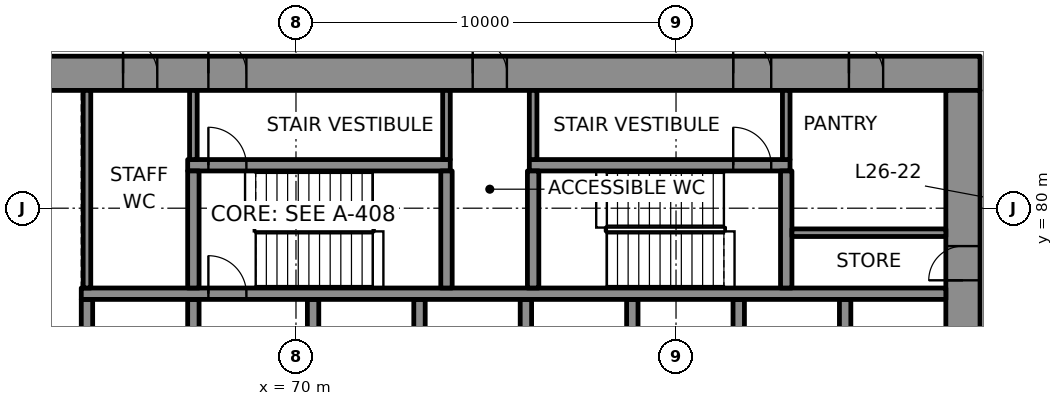
"""IFC4 building model, lengths in metres.
Left out: names, types, materials, properties, quantities, classifications, styles, units other than length and angle.
Written with IfcOpenShell. Run it as: python <this file> out.ifc"""

import sys

from ifc_helpers import new_model, si_unit, direction, frame, frame_2d, origin, place, context, subcontext, project, spatial, rectangle, extrude, element, fill, save


model = new_model("IFC4")
c1 = context("Model", 3, precision=1e-05, world=origin(), true_north=direction((0.0, 1.0)))
c2 = subcontext(c1, "Body", "Model", "MODEL_VIEW")
j1 = project(units=[si_unit("LENGTHUNIT", "METRE"), si_unit("PLANEANGLEUNIT", "RADIAN")], contexts=[c1])
p1 = place(None, origin())
s1 = spatial("IfcSite", under=j1, at=p1, CompositionType="ELEMENT")
p2 = place(p1, origin())
s2 = spatial("IfcBuilding", under=s1, at=p2, CompositionType="ELEMENT")
p3 = place(p2, frame((0.0, 0.0, 115.6)))
s3 = spatial("IfcBuildingStorey", under=s2, at=p3, CompositionType="ELEMENT", Elevation=115.6)
p4 = place(p3, frame((62.9, 83.55, 0.0), z_axis=(0.0, 0.0, 1.0), x_axis=(1.0, 0.0, 0.0)))
e1 = element("IfcWall", 1, at=p4, inside=s3, PredefinedType="SHEAR", context=c2, shape_type="SweptSolid", body=[
    extrude(rectangle(XDim=25.1, YDim=0.9, at=frame_2d((12.55, 0.0))), origin(), (0.0, 0.0, 1.0), 4.0),
])
p5 = place(p4, frame((4.795, 0.0, 0.0)))
e2 = element("IfcOpeningElement", 2, at=p5, cuts=e1, PredefinedType="OPENING", context=c2, shape_type="SweptSolid", body=[
    extrude(rectangle(XDim=1.0, YDim=2.1, at=frame_2d((0.5, 1.05))), frame((0.0, 0.46, 0.0), z_axis=(0.0, -1.0, 0.0), x_axis=(1.0, 0.0, 0.0)), (0.0, 0.0, 1.0), 0.92),
])
p6 = place(p4, frame((18.605, 0.0, 0.0)))
e3 = element("IfcOpeningElement", 3, at=p6, cuts=e1, PredefinedType="OPENING", context=c2, shape_type="SweptSolid", body=[
    extrude(rectangle(XDim=1.0, YDim=2.1, at=frame_2d((0.5, 1.05))), frame((0.0, 0.46, 0.0), z_axis=(0.0, -1.0, 0.0), x_axis=(1.0, 0.0, 0.0)), (0.0, 0.0, 1.0), 0.92),
])
p7 = place(p4, frame((2.55, 0.0, 0.0)))
e4 = element("IfcOpeningElement", 4, at=p7, cuts=e1, PredefinedType="OPENING", context=c2, shape_type="SweptSolid", body=[
    extrude(rectangle(XDim=0.9, YDim=2.1, at=frame_2d((0.45, 1.05))), frame((0.0, 0.46, 0.0), z_axis=(0.0, -1.0, 0.0), x_axis=(1.0, 0.0, 0.0)), (0.0, 0.0, 1.0), 0.92),
])
p8 = place(p4, frame((11.75, 0.0, 0.0)))
e5 = element("IfcOpeningElement", 5, at=p8, cuts=e1, PredefinedType="OPENING", context=c2, shape_type="SweptSolid", body=[
    extrude(rectangle(XDim=0.9, YDim=2.1, at=frame_2d((0.45, 1.05))), frame((0.0, 0.46, 0.0), z_axis=(0.0, -1.0, 0.0), x_axis=(1.0, 0.0, 0.0)), (0.0, 0.0, 1.0), 0.92),
])
p9 = place(p4, frame((21.65, 0.0, 0.0)))
e6 = element("IfcOpeningElement", 6, at=p9, cuts=e1, PredefinedType="OPENING", context=c2, shape_type="SweptSolid", body=[
    extrude(rectangle(XDim=0.9, YDim=2.1, at=frame_2d((0.45, 1.05))), frame((0.0, 0.46, 0.0), z_axis=(0.0, -1.0, 0.0), x_axis=(1.0, 0.0, 0.0)), (0.0, 0.0, 1.0), 0.92),
])
p10 = place(p3, frame((87.55, 66.9, 0.0), z_axis=(0.0, 0.0, 1.0), x_axis=(0.0, 1.0, 0.0)))
e7 = element("IfcWall", 7, at=p10, inside=s3, PredefinedType="SHEAR", context=c2, shape_type="SweptSolid", body=[
    extrude(rectangle(XDim=16.2, YDim=0.9, at=frame_2d((8.1, 0.0))), origin(), (0.0, 0.0, 1.0), 4.0),
])
p11 = place(p10, frame((5.5, 0.0, 0.0)))
e8 = element("IfcOpeningElement", 8, at=p11, cuts=e7, PredefinedType="OPENING", context=c2, shape_type="SweptSolid", body=[
    extrude(rectangle(XDim=1.8, YDim=2.1, at=frame_2d((0.9, 1.05))), frame((0.0, 0.46, 0.0), z_axis=(0.0, -1.0, 0.0), x_axis=(1.0, 0.0, 0.0)), (0.0, 0.0, 1.0), 0.92),
])
p12 = place(p10, frame((11.202, 0.0, 0.0)))
e9 = element("IfcOpeningElement", 9, at=p12, cuts=e7, PredefinedType="OPENING", context=c2, shape_type="SweptSolid", body=[
    extrude(rectangle(XDim=0.9, YDim=2.1, at=frame_2d((0.45, 1.05))), frame((0.0, 0.46, 0.0), z_axis=(0.0, -1.0, 0.0), x_axis=(1.0, 0.0, 0.0)), (0.0, 0.0, 1.0), 0.92),
])
for number, where, z_axis, x_axis in (
    (10, (64.5, 75.0, 0.0), (0.0, 0.0, 1.0), (0.0, 1.0, 0.0)),
    (11, (67.3, 75.0, 0.0), (0.0, 0.0, 1.0), (0.0, 1.0, 0.0)),
):
    element("IfcWall", number, at=place(p3, frame(where, z_axis=z_axis, x_axis=x_axis)), inside=s3, PredefinedType="SHEAR", context=c2, shape_type="SweptSolid", body=[
        extrude(rectangle(XDim=2.6, YDim=0.3, at=frame_2d((1.3, 0.0))), origin(), (0.0, 0.0, 1.0), 4.0),
    ])
p13 = place(p3, frame((70.45, 75.0, 0.0), z_axis=(0.0, 0.0, 1.0), x_axis=(0.0, 1.0, 0.0)))
e12 = element("IfcWall", 12, at=p13, inside=s3, PredefinedType="SHEAR", context=c2, shape_type="SweptSolid", body=[
    extrude(rectangle(XDim=2.6, YDim=0.3, at=frame_2d((1.3, 0.0))), origin(), (0.0, 0.0, 1.0), 4.0),
])
p14 = place(p13, frame((0.15, 0.0, 0.0)))
e13 = element("IfcOpeningElement", 13, at=p14, cuts=e12, PredefinedType="OPENING", context=c2, shape_type="SweptSolid", body=[
    extrude(rectangle(XDim=1.1, YDim=2.1, at=frame_2d((0.55, 1.05))), frame((0.0, 0.16, 0.0), z_axis=(0.0, -1.0, 0.0), x_axis=(1.0, 0.0, 0.0)), (0.0, 0.0, 1.0), 0.32),
])
for number, where, z_axis, x_axis in (
    (14, (73.25, 75.0, 0.0), (0.0, 0.0, 1.0), (0.0, 1.0, 0.0)),
    (15, (76.05, 75.0, 0.0), (0.0, 0.0, 1.0), (0.0, 1.0, 0.0)),
    (16, (78.85, 75.0, 0.0), (0.0, 0.0, 1.0), (0.0, 1.0, 0.0)),
    (17, (81.65, 75.0, 0.0), (0.0, 0.0, 1.0), (0.0, 1.0, 0.0)),
    (18, (84.45, 75.0, 0.0), (0.0, 0.0, 1.0), (0.0, 1.0, 0.0)),
):
    element("IfcWall", number, at=place(p3, frame(where, z_axis=z_axis, x_axis=x_axis)), inside=s3, PredefinedType="SHEAR", context=c2, shape_type="SweptSolid", body=[
        extrude(rectangle(XDim=2.6, YDim=0.3, at=frame_2d((1.3, 0.0))), origin(), (0.0, 0.0, 1.0), 4.0),
    ])
p15 = place(p3, frame((64.35, 77.75, 0.0), z_axis=(0.0, 0.0, 1.0), x_axis=(1.0, 0.0, 0.0)))
e19 = element("IfcWall", 19, at=p15, inside=s3, PredefinedType="SHEAR", context=c2, shape_type="SweptSolid", body=[
    extrude(rectangle(XDim=22.75, YDim=0.3, at=frame_2d((11.375, 0.0))), origin(), (0.0, 0.0, 1.0), 4.0),
])
p16 = place(p15, frame((3.345, 0.0, 0.0)))
e20 = element("IfcOpeningElement", 20, at=p16, cuts=e19, PredefinedType="OPENING", context=c2, shape_type="SweptSolid", body=[
    extrude(rectangle(XDim=1.0, YDim=2.1, at=frame_2d((0.5, 1.05))), frame((0.0, 0.16, 0.0), z_axis=(0.0, -1.0, 0.0), x_axis=(1.0, 0.0, 0.0)), (0.0, 0.0, 1.0), 0.32),
])
p17 = place(p3, frame((67.15, 81.13, 0.0), z_axis=(0.0, 0.0, 1.0), x_axis=(1.0, 0.0, 0.0)))
e21 = element("IfcWall", 21, at=p17, inside=s3, PredefinedType="SHEAR", context=c2, shape_type="SweptSolid", body=[
    extrude(rectangle(XDim=6.91, YDim=0.3, at=frame_2d((3.455, 0.0))), origin(), (0.0, 0.0, 1.0), 4.0),
])
p18 = place(p17, frame((0.545, 0.0, 0.0)))
e22 = element("IfcOpeningElement", 22, at=p18, cuts=e21, PredefinedType="OPENING", context=c2, shape_type="SweptSolid", body=[
    extrude(rectangle(XDim=1.0, YDim=2.1, at=frame_2d((0.5, 1.05))), frame((0.0, 0.16, 0.0), z_axis=(0.0, -1.0, 0.0), x_axis=(1.0, 0.0, 0.0)), (0.0, 0.0, 1.0), 0.32),
])
p19 = place(p3, frame((76.14, 81.13, 0.0), z_axis=(0.0, 0.0, 1.0), x_axis=(1.0, 0.0, 0.0)))
e23 = element("IfcWall", 23, at=p19, inside=s3, PredefinedType="SHEAR", context=c2, shape_type="SweptSolid", body=[
    extrude(rectangle(XDim=6.86, YDim=0.3, at=frame_2d((3.43, 0.0))), origin(), (0.0, 0.0, 1.0), 4.0),
])
p20 = place(p19, frame((5.365, 0.0, 0.0)))
e24 = element("IfcOpeningElement", 24, at=p20, cuts=e23, PredefinedType="OPENING", context=c2, shape_type="SweptSolid", body=[
    extrude(rectangle(XDim=1.0, YDim=2.1, at=frame_2d((0.5, 1.05))), frame((0.0, 0.16, 0.0), z_axis=(0.0, -1.0, 0.0), x_axis=(1.0, 0.0, 0.0)), (0.0, 0.0, 1.0), 0.32),
])
for number, where, z_axis, x_axis in (
    (25, (67.3, 77.9, 0.0), (0.0, 0.0, 1.0), (0.0, 1.0, 0.0)),
    (26, (73.96, 77.9, 0.0), (0.0, 0.0, 1.0), (0.0, 1.0, 0.0)),
    (27, (76.24, 77.9, 0.0), (0.0, 0.0, 1.0), (0.0, 1.0, 0.0)),
    (28, (82.9, 77.9, 0.0), (0.0, 0.0, 1.0), (0.0, 1.0, 0.0)),
):
    element("IfcWall", number, at=place(p3, frame(where, z_axis=z_axis, x_axis=x_axis)), inside=s3, PredefinedType="SHEAR", context=c2, shape_type="SweptSolid", body=[
        extrude(rectangle(XDim=3.08, YDim=0.3, at=frame_2d((1.54, 0.0))), origin(), (0.0, 0.0, 1.0), 4.0),
    ])
p21 = place(p3, frame((69.117, 112.258, 0.0), z_axis=(0.0, 0.0, 1.0), x_axis=(-0.5000008632, -0.866024905415, 0.0)))
e29 = element("IfcWall", 29, at=p21, inside=s3, PredefinedType="SOLIDWALL", context=c2, shape_type="SweptSolid", body=[
    extrude(rectangle(XDim=40.13, YDim=0.8, at=frame_2d((20.065, 0.0))), origin(), (0.0, 0.0, 1.0), 0.9),
])
p22 = place(p3, frame((83.05, 79.355, 0.0), z_axis=(0.0, 0.0, 1.0), x_axis=(1.0, 0.0, 0.0)))
e30 = element("IfcWall", 30, at=p22, inside=s3, PredefinedType="PARTITIONING", context=c2, shape_type="SweptSolid", body=[
    extrude(rectangle(XDim=4.05, YDim=0.2, at=frame_2d((2.025, 0.0))), origin(), (0.0, 0.0, 1.0), 4.0),
])
p23 = place(p3, frame((64.5, 77.9, 0.0), z_axis=(0.0, 0.0, 1.0), x_axis=(0.0, 1.0, 0.0)))
e31 = element("IfcWall", 31, at=p23, inside=s3, PredefinedType="PARTITIONING", context=c2, shape_type="SweptSolid", body=[
    extrude(rectangle(XDim=5.2, YDim=0.2, at=frame_2d((2.6, 0.0))), origin(), (0.0, 0.0, 1.0), 4.0),
])
for number, where, z_axis, x_axis in (
    (32, (67.3, 81.28, 0.0), (0.0, 0.0, 1.0), (0.0, 1.0, 0.0)),
    (33, (73.96, 81.28, 0.0), (0.0, 0.0, 1.0), (0.0, 1.0, 0.0)),
    (34, (76.24, 81.28, 0.0), (0.0, 0.0, 1.0), (0.0, 1.0, 0.0)),
    (35, (82.9, 81.28, 0.0), (0.0, 0.0, 1.0), (0.0, 1.0, 0.0)),
):
    element("IfcWall", number, at=place(p3, frame(where, z_axis=z_axis, x_axis=x_axis)), inside=s3, PredefinedType="PARTITIONING", context=c2, shape_type="SweptSolid", body=[
        extrude(rectangle(XDim=1.82, YDim=0.2, at=frame_2d((0.91, 0.0))), origin(), (0.0, 0.0, 1.0), 4.0),
    ])
p24 = place(p16, origin())
e36 = element("IfcDoor", 36, at=p24, inside=s3, OperationType="SINGLE_SWING_LEFT", PredefinedType="DOOR", context=c2, shape_type="SweptSolid", body=[
    extrude(rectangle(XDim=1.0, YDim=2.1, at=frame_2d((0.5, 1.05))), frame((0.0, 0.025, 0.0), z_axis=(0.0, -1.0, 0.0), x_axis=(1.0, 0.0, 0.0)), (0.0, 0.0, 1.0), 0.05),
])
fill(e20, e36)
p25 = place(p18, origin())
e37 = element("IfcDoor", 37, at=p25, inside=s3, OperationType="SINGLE_SWING_RIGHT", PredefinedType="DOOR", context=c2, shape_type="SweptSolid", body=[
    extrude(rectangle(XDim=1.0, YDim=2.1, at=frame_2d((0.5, 1.05))), frame((0.0, 0.025, 0.0), z_axis=(0.0, -1.0, 0.0), x_axis=(1.0, 0.0, 0.0)), (0.0, 0.0, 1.0), 0.05),
])
fill(e22, e37)
p26 = place(p5, origin())
e38 = element("IfcDoor", 38, at=p26, inside=s3, OperationType="SINGLE_SWING_LEFT", PredefinedType="DOOR", context=c2, shape_type="SweptSolid", body=[
    extrude(rectangle(XDim=1.0, YDim=2.1, at=frame_2d((0.5, 1.05))), frame((0.0, 0.17, 0.0), z_axis=(0.0, -1.0, 0.0), x_axis=(1.0, 0.0, 0.0)), (0.0, 0.0, 1.0), 0.34),
])
fill(e2, e38)
p27 = place(p20, origin())
e39 = element("IfcDoor", 39, at=p27, inside=s3, OperationType="SINGLE_SWING_RIGHT", PredefinedType="DOOR", context=c2, shape_type="SweptSolid", body=[
    extrude(rectangle(XDim=1.0, YDim=2.1, at=frame_2d((0.5, 1.05))), frame((0.0, 0.025, 0.0), z_axis=(0.0, -1.0, 0.0), x_axis=(1.0, 0.0, 0.0)), (0.0, 0.0, 1.0), 0.05),
])
fill(e24, e39)
p28 = place(p6, origin())
e40 = element("IfcDoor", 40, at=p28, inside=s3, OperationType="SINGLE_SWING_LEFT", PredefinedType="DOOR", context=c2, shape_type="SweptSolid", body=[
    extrude(rectangle(XDim=1.0, YDim=2.1, at=frame_2d((0.5, 1.05))), frame((0.0, 0.17, 0.0), z_axis=(0.0, -1.0, 0.0), x_axis=(1.0, 0.0, 0.0)), (0.0, 0.0, 1.0), 0.34),
])
fill(e3, e40)
p29 = place(p7, origin())
e41 = element("IfcDoor", 41, at=p29, inside=s3, OperationType="SINGLE_SWING_RIGHT", PredefinedType="DOOR", context=c2, shape_type="SweptSolid", body=[
    extrude(rectangle(XDim=0.9, YDim=2.1, at=frame_2d((0.45, 1.05))), frame((0.0, 0.17, 0.0), z_axis=(0.0, -1.0, 0.0), x_axis=(1.0, 0.0, 0.0)), (0.0, 0.0, 1.0), 0.34),
])
fill(e4, e41)
p30 = place(p8, origin())
e42 = element("IfcDoor", 42, at=p30, inside=s3, OperationType="SINGLE_SWING_LEFT", PredefinedType="DOOR", context=c2, shape_type="SweptSolid", body=[
    extrude(rectangle(XDim=0.9, YDim=2.1, at=frame_2d((0.45, 1.05))), frame((0.0, 0.17, 0.0), z_axis=(0.0, -1.0, 0.0), x_axis=(1.0, 0.0, 0.0)), (0.0, 0.0, 1.0), 0.34),
])
fill(e5, e42)
p31 = place(p12, origin())
e43 = element("IfcDoor", 43, at=p31, inside=s3, OperationType="SINGLE_SWING_RIGHT", PredefinedType="DOOR", context=c2, shape_type="SweptSolid", body=[
    extrude(rectangle(XDim=0.9, YDim=2.1, at=frame_2d((0.45, 1.05))), frame((0.0, 0.17, 0.0), z_axis=(0.0, -1.0, 0.0), x_axis=(1.0, 0.0, 0.0)), (0.0, 0.0, 1.0), 0.34),
])
fill(e9, e43)
p32 = place(p9, origin())
e44 = element("IfcDoor", 44, at=p32, inside=s3, OperationType="SINGLE_SWING_LEFT", PredefinedType="DOOR", context=c2, shape_type="SweptSolid", body=[
    extrude(rectangle(XDim=0.9, YDim=2.1, at=frame_2d((0.45, 1.05))), frame((0.0, 0.17, 0.0), z_axis=(0.0, -1.0, 0.0), x_axis=(1.0, 0.0, 0.0)), (0.0, 0.0, 1.0), 0.34),
])
fill(e6, e44)
save(model, sys.argv[1])
